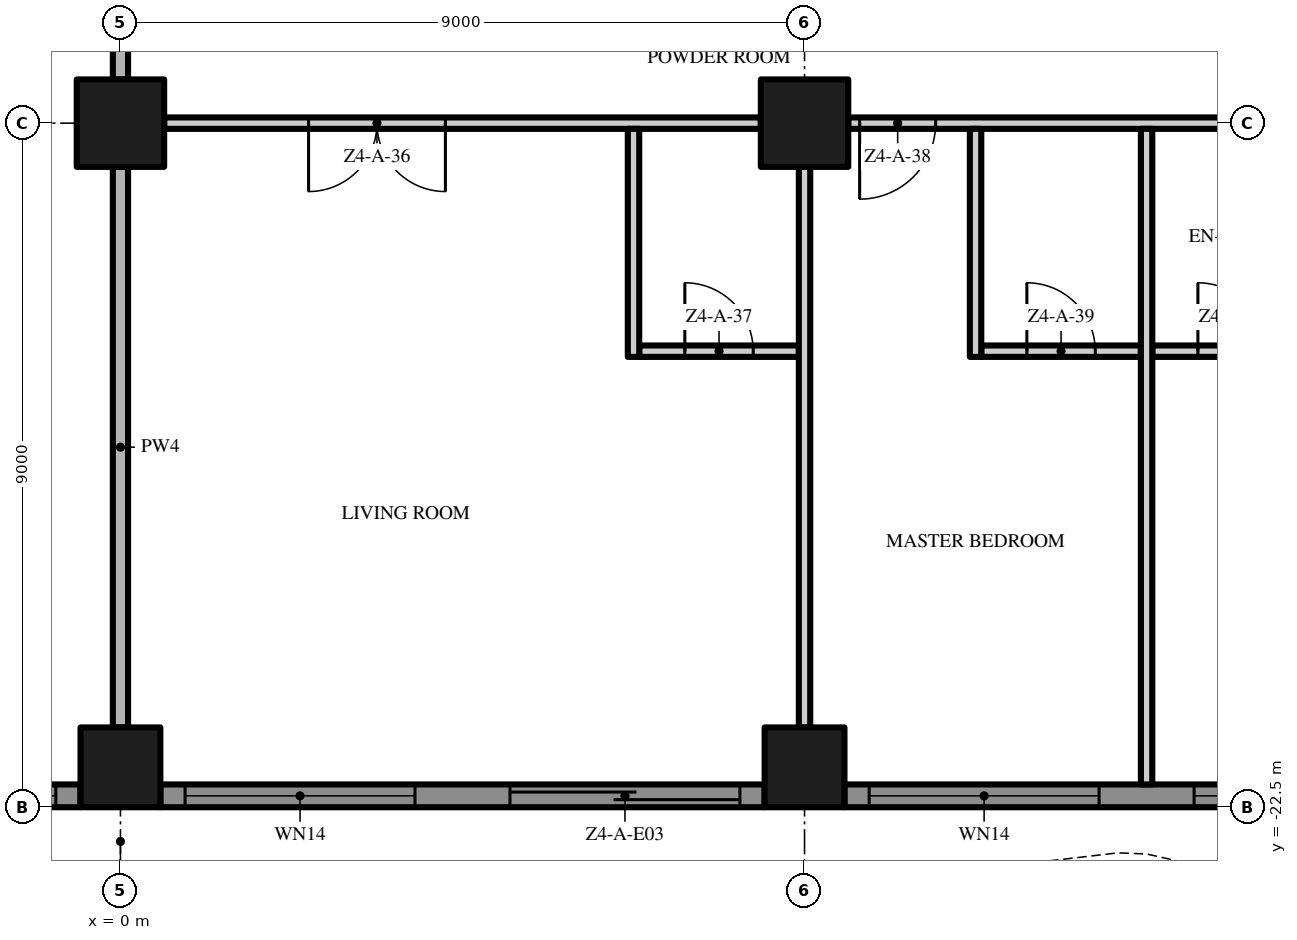
"""IFC4 building model, lengths in metres.
Left out: names, types, materials, properties, quantities, classifications, styles, units other than length and angle.
Written with IfcOpenShell. Run it as: python <this file> out.ifc"""

import sys

from ifc_helpers import new_model, si_unit, direction, frame, frame_2d, origin, origin_2d, place, context, subcontext, project, spatial, polyline, rectangle, outline, extrude, element, fill, save


model = new_model("IFC4")
c1 = context("Model", 3, precision=1e-05, world=origin(), true_north=direction((0.0, 1.0)))
c2 = subcontext(c1, "Body", "Model", "MODEL_VIEW")
j1 = project(units=[si_unit("LENGTHUNIT", "METRE"), si_unit("PLANEANGLEUNIT", "RADIAN")], contexts=[c1])
p1 = place(None, origin())
s1 = spatial("IfcSite", under=j1, at=p1, CompositionType="ELEMENT")
p2 = place(p1, origin())
s2 = spatial("IfcBuilding", under=s1, at=p2, CompositionType="ELEMENT")
p3 = place(p2, frame((0.0, 0.0, 192.0)))
s3 = spatial("IfcBuildingStorey", under=s2, at=p3, CompositionType="ELEMENT", Elevation=192.0)
p4 = place(p3, frame((0.0, -13.5, 0.0), z_axis=(0.0, 0.0, 1.0), x_axis=(1.0, 0.0, 0.0)))
e1 = element("IfcColumn", 1, at=p4, inside=s3, PredefinedType="COLUMN", context=c2, shape_type="SweptSolid", body=[
    extrude(rectangle(XDim=1.15, YDim=1.15, at=origin_2d()), origin(), (0.0, 0.0, 1.0), 3.5),
])
p5 = place(p3, frame((0.0, -21.975, 0.0), z_axis=(0.0, 0.0, 1.0), x_axis=(1.0, 0.0, 0.0)))
e2 = element("IfcColumn", 2, at=p5, inside=s3, PredefinedType="COLUMN", context=c2, shape_type="SweptSolid", body=[
    extrude(rectangle(XDim=1.05, YDim=1.05, at=origin_2d()), origin(), (0.0, 0.0, 1.0), 3.5),
])
p6 = place(p3, frame((9.0, -13.5, 0.0), z_axis=(0.0, 0.0, 1.0), x_axis=(1.0, 0.0, 0.0)))
e3 = element("IfcColumn", 3, at=p6, inside=s3, PredefinedType="COLUMN", context=c2, shape_type="SweptSolid", body=[
    extrude(rectangle(XDim=1.15, YDim=1.15, at=origin_2d()), origin(), (0.0, 0.0, 1.0), 3.5),
])
p7 = place(p3, frame((9.0, -21.975, 0.0), z_axis=(0.0, 0.0, 1.0), x_axis=(1.0, 0.0, 0.0)))
e4 = element("IfcColumn", 4, at=p7, inside=s3, PredefinedType="COLUMN", context=c2, shape_type="SweptSolid", body=[
    extrude(rectangle(XDim=1.05, YDim=1.05, at=origin_2d()), origin(), (0.0, 0.0, 1.0), 3.5),
])
p8 = place(p3, frame((-0.525, -22.35, 0.0), z_axis=(0.0, 0.0, 1.0), x_axis=(-1.0, 0.0, 0.0)))
e5 = element("IfcWall", 5, at=p8, inside=s3, PredefinedType="SOLIDWALL", context=c2, shape_type="SweptSolid", body=[
    extrude(rectangle(XDim=7.95, YDim=0.3, at=frame_2d((3.975, 0.0))), origin(), (0.0, 0.0, 1.0), 3.5),
])
p9 = place(p8, frame((4.6, 0.0, 0.0)))
e6 = element("IfcOpeningElement", 6, at=p9, cuts=e5, PredefinedType="OPENING", context=c2, shape_type="SweptSolid", body=[
    extrude(rectangle(XDim=3.025, YDim=2.4, at=frame_2d((1.512, 1.2))), frame((0.0, 0.16, 0.0), z_axis=(0.0, -1.0, 0.0), x_axis=(1.0, 0.0, 0.0)), (0.0, 0.0, 1.0), 0.32),
])
p10 = place(p8, frame((0.325, 0.0, 0.45)))
e7 = element("IfcOpeningElement", 7, at=p10, cuts=e5, PredefinedType="OPENING", context=c2, shape_type="SweptSolid", body=[
    extrude(rectangle(XDim=3.025, YDim=2.65, at=frame_2d((1.512, 1.325))), frame((0.0, 0.16, 0.0), z_axis=(0.0, -1.0, 0.0), x_axis=(1.0, 0.0, 0.0)), (0.0, 0.0, 1.0), 0.32),
])
p11 = place(p3, frame((8.475, -22.35, 0.0), z_axis=(0.0, 0.0, 1.0), x_axis=(-1.0, 0.0, 0.0)))
e8 = element("IfcWall", 8, at=p11, inside=s3, PredefinedType="SOLIDWALL", context=c2, shape_type="SweptSolid", body=[
    extrude(rectangle(XDim=7.95, YDim=0.3, at=frame_2d((3.975, 0.0))), origin(), (0.0, 0.0, 1.0), 3.5),
])
p12 = place(p11, frame((4.6, 0.0, 0.45)))
e9 = element("IfcOpeningElement", 9, at=p12, cuts=e8, PredefinedType="OPENING", context=c2, shape_type="SweptSolid", body=[
    extrude(rectangle(XDim=3.025, YDim=2.65, at=frame_2d((1.512, 1.325))), frame((0.0, 0.16, 0.0), z_axis=(0.0, -1.0, 0.0), x_axis=(1.0, 0.0, 0.0)), (0.0, 0.0, 1.0), 0.32),
])
p13 = place(p11, frame((0.325, 0.0, 0.0)))
e10 = element("IfcOpeningElement", 10, at=p13, cuts=e8, PredefinedType="OPENING", context=c2, shape_type="SweptSolid", body=[
    extrude(rectangle(XDim=3.025, YDim=2.4, at=frame_2d((1.512, 1.2))), frame((0.0, 0.16, 0.0), z_axis=(0.0, -1.0, 0.0), x_axis=(1.0, 0.0, 0.0)), (0.0, 0.0, 1.0), 0.32),
])
p14 = place(p3, frame((17.475, -22.35, 0.0), z_axis=(0.0, 0.0, 1.0), x_axis=(-1.0, 0.0, 0.0)))
e11 = element("IfcWall", 11, at=p14, inside=s3, PredefinedType="SOLIDWALL", context=c2, shape_type="SweptSolid", body=[
    extrude(rectangle(XDim=7.95, YDim=0.3, at=frame_2d((3.975, 0.0))), origin(), (0.0, 0.0, 1.0), 3.5),
])
p15 = place(p14, frame((4.6, 0.0, 0.45)))
e12 = element("IfcOpeningElement", 12, at=p15, cuts=e11, PredefinedType="OPENING", context=c2, shape_type="SweptSolid", body=[
    extrude(rectangle(XDim=3.025, YDim=2.65, at=frame_2d((1.512, 1.325))), frame((0.0, 0.16, 0.0), z_axis=(0.0, -1.0, 0.0), x_axis=(1.0, 0.0, 0.0)), (0.0, 0.0, 1.0), 0.32),
])
p16 = place(p14, frame((0.325, 0.0, 0.45)))
e13 = element("IfcOpeningElement", 13, at=p16, cuts=e11, PredefinedType="OPENING", context=c2, shape_type="SweptSolid", body=[
    extrude(rectangle(XDim=3.025, YDim=2.65, at=frame_2d((1.512, 1.325))), frame((0.0, 0.16, 0.0), z_axis=(0.0, -1.0, 0.0), x_axis=(1.0, 0.0, 0.0)), (0.0, 0.0, 1.0), 0.32),
])
p17 = place(p3, origin())
e14 = element("IfcWall", 14, at=p17, inside=s3, PredefinedType="USERDEFINED", context=c2, shape_type="SweptSolid", body=[
    extrude(outline(polyline([(-22.5, -25.149), (-21.0, -24.488), (-19.5, -23.755), (-18.0, -23.231), (-16.875, -23.1), (-16.5, -23.115), (-15.0, -23.451), (-13.5, -24.112), (-12.0, -24.845), (-10.5, -25.369), (-9.375, -25.5), (-9.0, -25.485), (-7.5, -25.149), (-6.0, -24.488), (-4.5, -23.755), (-3.0, -23.231), (-1.875, -23.1), (-1.5, -23.115), (0.0, -23.451), (1.5, -24.112), (3.0, -24.845), (4.5, -25.369), (5.625, -25.5), (6.0, -25.485), (7.5, -25.149), (9.0, -24.488), (10.5, -23.755), (12.0, -23.231), (13.125, -23.1), (13.5, -23.115), (15.0, -23.451), (16.5, -24.112), (18.0, -24.845), (19.5, -25.369), (20.625, -25.5), (21.0, -25.485), (22.5, -25.149), (22.445, -24.905), (20.967, -25.236), (20.635, -25.249), (19.556, -25.124), (18.096, -24.614), (16.605, -23.885), (15.079, -23.213), (13.533, -22.866), (13.115, -22.849), (11.944, -22.986), (10.404, -23.524), (8.895, -24.261), (7.421, -24.91), (5.967, -25.236), (5.635, -25.249), (4.556, -25.124), (3.096, -24.614), (1.605, -23.885), (0.079, -23.213), (-1.467, -22.866), (-1.885, -22.849), (-3.056, -22.986), (-4.596, -23.524), (-6.105, -24.261), (-7.579, -24.91), (-9.033, -25.236), (-9.365, -25.249), (-10.444, -25.124), (-11.904, -24.614), (-13.395, -23.885), (-14.921, -23.213), (-16.467, -22.866), (-16.885, -22.849), (-18.056, -22.986), (-19.596, -23.524), (-21.105, -24.261), (-22.601, -24.92), (-22.5, -25.149)])), origin(), (0.0, 0.0, 1.0), 0.9),
])
p18 = place(p3, frame((6.825, -16.5, 0.0), z_axis=(0.0, 0.0, 1.0), x_axis=(1.0, 0.0, 0.0)))
e15 = element("IfcWall", 15, at=p18, inside=s3, PredefinedType="PARTITIONING", context=c2, shape_type="SweptSolid", body=[
    extrude(rectangle(XDim=2.1, YDim=0.15, at=frame_2d((1.05, 0.0))), origin(), (0.0, 0.0, 1.0), 3.5),
])
p19 = place(p18, frame((0.6, 0.0, 0.0)))
e16 = element("IfcOpeningElement", 16, at=p19, cuts=e15, PredefinedType="OPENING", context=c2, shape_type="SweptSolid", body=[
    extrude(rectangle(XDim=0.9, YDim=2.1, at=frame_2d((0.45, 1.05))), frame((0.0, 0.085, 0.0), z_axis=(0.0, -1.0, 0.0), x_axis=(1.0, 0.0, 0.0)), (0.0, 0.0, 1.0), 0.17),
])
p20 = place(p3, frame((11.325, -16.5, 0.0), z_axis=(0.0, 0.0, 1.0), x_axis=(1.0, 0.0, 0.0)))
e17 = element("IfcWall", 17, at=p20, inside=s3, PredefinedType="PARTITIONING", context=c2, shape_type="SweptSolid", body=[
    extrude(rectangle(XDim=2.1, YDim=0.15, at=frame_2d((1.05, 0.0))), origin(), (0.0, 0.0, 1.0), 3.5),
])
p21 = place(p20, frame((0.6, 0.0, 0.0)))
e18 = element("IfcOpeningElement", 18, at=p21, cuts=e17, PredefinedType="OPENING", context=c2, shape_type="SweptSolid", body=[
    extrude(rectangle(XDim=0.9, YDim=2.1, at=frame_2d((0.45, 1.05))), frame((0.0, 0.085, 0.0), z_axis=(0.0, -1.0, 0.0), x_axis=(1.0, 0.0, 0.0)), (0.0, 0.0, 1.0), 0.17),
])
p22 = place(p3, frame((13.575, -16.5, 0.0), z_axis=(0.0, 0.0, 1.0), x_axis=(1.0, 0.0, 0.0)))
e19 = element("IfcWall", 19, at=p22, inside=s3, PredefinedType="PARTITIONING", context=c2, shape_type="SweptSolid", body=[
    extrude(rectangle(XDim=2.1, YDim=0.15, at=frame_2d((1.05, 0.0))), origin(), (0.0, 0.0, 1.0), 3.5),
])
p23 = place(p22, frame((0.6, 0.0, 0.0)))
e20 = element("IfcOpeningElement", 20, at=p23, cuts=e19, PredefinedType="OPENING", context=c2, shape_type="SweptSolid", body=[
    extrude(rectangle(XDim=0.9, YDim=2.1, at=frame_2d((0.45, 1.05))), frame((0.0, 0.085, 0.0), z_axis=(0.0, -1.0, 0.0), x_axis=(1.0, 0.0, 0.0)), (0.0, 0.0, 1.0), 0.17),
])
p24 = place(p3, frame((8.425, -13.5, 0.0), z_axis=(0.0, 0.0, 1.0), x_axis=(-1.0, 0.0, 0.0)))
e21 = element("IfcWall", 21, at=p24, inside=s3, PredefinedType="PARTITIONING", context=c2, shape_type="SweptSolid", body=[
    extrude(rectangle(XDim=7.85, YDim=0.15, at=frame_2d((3.925, 0.0))), origin(), (0.0, 0.0, 1.0), 3.5),
])
p25 = place(p24, frame((4.15, 0.0, 0.0)))
e22 = element("IfcOpeningElement", 22, at=p25, cuts=e21, PredefinedType="OPENING", context=c2, shape_type="SweptSolid", body=[
    extrude(rectangle(XDim=1.8, YDim=2.4, at=frame_2d((0.9, 1.2))), frame((0.0, 0.085, 0.0), z_axis=(0.0, -1.0, 0.0), x_axis=(1.0, 0.0, 0.0)), (0.0, 0.0, 1.0), 0.17),
])
p26 = place(p3, frame((17.425, -13.5, 0.0), z_axis=(0.0, 0.0, 1.0), x_axis=(-1.0, 0.0, 0.0)))
e23 = element("IfcWall", 23, at=p26, inside=s3, PredefinedType="PARTITIONING", context=c2, shape_type="SweptSolid", body=[
    extrude(rectangle(XDim=7.85, YDim=0.15, at=frame_2d((3.925, 0.0))), origin(), (0.0, 0.0, 1.0), 3.5),
])
p27 = place(p26, frame((6.7, 0.0, 0.0)))
e24 = element("IfcOpeningElement", 24, at=p27, cuts=e23, PredefinedType="OPENING", context=c2, shape_type="SweptSolid", body=[
    extrude(rectangle(XDim=1.0, YDim=2.4, at=frame_2d((0.5, 1.2))), frame((0.0, 0.085, 0.0), z_axis=(0.0, -1.0, 0.0), x_axis=(1.0, 0.0, 0.0)), (0.0, 0.0, 1.0), 0.17),
])
p28 = place(p26, frame((0.15, 0.0, 0.0)))
e25 = element("IfcOpeningElement", 25, at=p28, cuts=e23, PredefinedType="OPENING", context=c2, shape_type="SweptSolid", body=[
    extrude(rectangle(XDim=1.0, YDim=2.4, at=frame_2d((0.5, 1.2))), frame((0.0, 0.085, 0.0), z_axis=(0.0, -1.0, 0.0), x_axis=(1.0, 0.0, 0.0)), (0.0, 0.0, 1.0), 0.17),
])
p29 = place(p3, frame((0.0, -21.45, 0.0), z_axis=(0.0, 0.0, 1.0), x_axis=(0.0, 1.0, 0.0)))
e26 = element("IfcWall", 26, at=p29, inside=s3, PredefinedType="PARTITIONING", context=c2, shape_type="SweptSolid", body=[
    extrude(rectangle(XDim=7.375, YDim=0.2, at=frame_2d((3.688, 0.0))), origin(), (0.0, 0.0, 1.0), 3.5),
])
p30 = place(p3, frame((0.0, -12.925, 0.0), z_axis=(0.0, 0.0, 1.0), x_axis=(0.0, 1.0, 0.0)))
e27 = element("IfcWall", 27, at=p30, inside=s3, PredefinedType="PARTITIONING", context=c2, shape_type="SweptSolid", body=[
    extrude(rectangle(XDim=7.85, YDim=0.2, at=frame_2d((3.925, 0.0))), origin(), (0.0, 0.0, 1.0), 3.5),
])
p31 = place(p3, frame((6.75, -16.575, 0.0), z_axis=(0.0, 0.0, 1.0), x_axis=(0.0, 1.0, 0.0)))
e28 = element("IfcWall", 28, at=p31, inside=s3, PredefinedType="PARTITIONING", context=c2, shape_type="SweptSolid", body=[
    extrude(rectangle(XDim=3.0, YDim=0.15, at=frame_2d((1.5, 0.0))), origin(), (0.0, 0.0, 1.0), 3.5),
])
p32 = place(p3, frame((9.0, -21.45, 0.0), z_axis=(0.0, 0.0, 1.0), x_axis=(0.0, 1.0, 0.0)))
e29 = element("IfcWall", 29, at=p32, inside=s3, PredefinedType="PARTITIONING", context=c2, shape_type="SweptSolid", body=[
    extrude(rectangle(XDim=7.375, YDim=0.15, at=frame_2d((3.688, 0.0))), origin(), (0.0, 0.0, 1.0), 3.5),
])
p33 = place(p3, frame((11.25, -16.575, 0.0), z_axis=(0.0, 0.0, 1.0), x_axis=(0.0, 1.0, 0.0)))
e30 = element("IfcWall", 30, at=p33, inside=s3, PredefinedType="PARTITIONING", context=c2, shape_type="SweptSolid", body=[
    extrude(rectangle(XDim=3.0, YDim=0.15, at=frame_2d((1.5, 0.0))), origin(), (0.0, 0.0, 1.0), 3.5),
])
p34 = place(p3, frame((13.5, -22.2, 0.0), z_axis=(0.0, 0.0, 1.0), x_axis=(0.0, 1.0, 0.0)))
e31 = element("IfcWall", 31, at=p34, inside=s3, PredefinedType="PARTITIONING", context=c2, shape_type="SweptSolid", body=[
    extrude(rectangle(XDim=8.625, YDim=0.15, at=frame_2d((4.312, 0.0))), origin(), (0.0, 0.0, 1.0), 3.5),
])
p35 = place(p10, origin())
e32 = element("IfcWindow", 32, at=p35, inside=s3, PartitioningType="SINGLE_PANEL", PredefinedType="WINDOW", context=c2, shape_type="SweptSolid", body=[
    extrude(rectangle(XDim=3.025, YDim=2.65, at=frame_2d((1.512, 1.325))), frame((0.0, 0.03, 0.0), z_axis=(0.0, -1.0, 0.0), x_axis=(1.0, 0.0, 0.0)), (0.0, 0.0, 1.0), 0.06),
])
fill(e7, e32)
p36 = place(p12, origin())
e33 = element("IfcWindow", 33, at=p36, inside=s3, PartitioningType="SINGLE_PANEL", PredefinedType="WINDOW", context=c2, shape_type="SweptSolid", body=[
    extrude(rectangle(XDim=3.025, YDim=2.65, at=frame_2d((1.512, 1.325))), frame((0.0, 0.03, 0.0), z_axis=(0.0, -1.0, 0.0), x_axis=(1.0, 0.0, 0.0)), (0.0, 0.0, 1.0), 0.06),
])
fill(e9, e33)
p37 = place(p13, origin())
e34 = element("IfcDoor", 34, at=p37, inside=s3, OperationType="SINGLE_SWING_LEFT", PredefinedType="DOOR", context=c2, shape_type="SweptSolid", body=[
    extrude(rectangle(XDim=3.025, YDim=2.4, at=frame_2d((1.512, 1.2))), frame((0.0, 0.025, 0.0), z_axis=(0.0, -1.0, 0.0), x_axis=(1.0, 0.0, 0.0)), (0.0, 0.0, 1.0), 0.05),
])
fill(e10, e34)
p38 = place(p15, origin())
e35 = element("IfcWindow", 35, at=p38, inside=s3, PartitioningType="SINGLE_PANEL", PredefinedType="WINDOW", context=c2, shape_type="SweptSolid", body=[
    extrude(rectangle(XDim=3.025, YDim=2.65, at=frame_2d((1.512, 1.325))), frame((0.0, 0.03, 0.0), z_axis=(0.0, -1.0, 0.0), x_axis=(1.0, 0.0, 0.0)), (0.0, 0.0, 1.0), 0.06),
])
fill(e12, e35)
p39 = place(p16, origin())
e36 = element("IfcWindow", 36, at=p39, inside=s3, PartitioningType="SINGLE_PANEL", PredefinedType="WINDOW", context=c2, shape_type="SweptSolid", body=[
    extrude(rectangle(XDim=3.025, YDim=2.65, at=frame_2d((1.512, 1.325))), frame((0.0, 0.03, 0.0), z_axis=(0.0, -1.0, 0.0), x_axis=(1.0, 0.0, 0.0)), (0.0, 0.0, 1.0), 0.06),
])
fill(e13, e36)
p40 = place(p25, origin())
e37 = element("IfcDoor", 37, at=p40, inside=s3, OperationType="DOUBLE_DOOR_SINGLE_SWING", PredefinedType="DOOR", context=c2, shape_type="SweptSolid", body=[
    extrude(rectangle(XDim=1.8, YDim=2.4, at=frame_2d((0.9, 1.2))), frame((0.0, 0.025, 0.0), z_axis=(0.0, -1.0, 0.0), x_axis=(1.0, 0.0, 0.0)), (0.0, 0.0, 1.0), 0.05),
])
fill(e22, e37)
p41 = place(p19, origin())
e38 = element("IfcDoor", 38, at=p41, inside=s3, OperationType="SINGLE_SWING_LEFT", PredefinedType="DOOR", context=c2, shape_type="SweptSolid", body=[
    extrude(rectangle(XDim=0.9, YDim=2.1, at=frame_2d((0.45, 1.05))), frame((0.0, 0.025, 0.0), z_axis=(0.0, -1.0, 0.0), x_axis=(1.0, 0.0, 0.0)), (0.0, 0.0, 1.0), 0.05),
])
fill(e16, e38)
p42 = place(p27, origin())
e39 = element("IfcDoor", 39, at=p42, inside=s3, OperationType="SINGLE_SWING_RIGHT", PredefinedType="DOOR", context=c2, shape_type="SweptSolid", body=[
    extrude(rectangle(XDim=1.0, YDim=2.4, at=frame_2d((0.5, 1.2))), frame((0.0, 0.025, 0.0), z_axis=(0.0, -1.0, 0.0), x_axis=(1.0, 0.0, 0.0)), (0.0, 0.0, 1.0), 0.05),
])
fill(e24, e39)
p43 = place(p21, origin())
e40 = element("IfcDoor", 40, at=p43, inside=s3, OperationType="SINGLE_SWING_LEFT", PredefinedType="DOOR", context=c2, shape_type="SweptSolid", body=[
    extrude(rectangle(XDim=0.9, YDim=2.1, at=frame_2d((0.45, 1.05))), frame((0.0, 0.025, 0.0), z_axis=(0.0, -1.0, 0.0), x_axis=(1.0, 0.0, 0.0)), (0.0, 0.0, 1.0), 0.05),
])
fill(e18, e40)
p44 = place(p23, origin())
e41 = element("IfcDoor", 41, at=p44, inside=s3, OperationType="SINGLE_SWING_LEFT", PredefinedType="DOOR", context=c2, shape_type="SweptSolid", body=[
    extrude(rectangle(XDim=0.9, YDim=2.1, at=frame_2d((0.45, 1.05))), frame((0.0, 0.025, 0.0), z_axis=(0.0, -1.0, 0.0), x_axis=(1.0, 0.0, 0.0)), (0.0, 0.0, 1.0), 0.05),
])
fill(e20, e41)
save(model, sys.argv[1])
